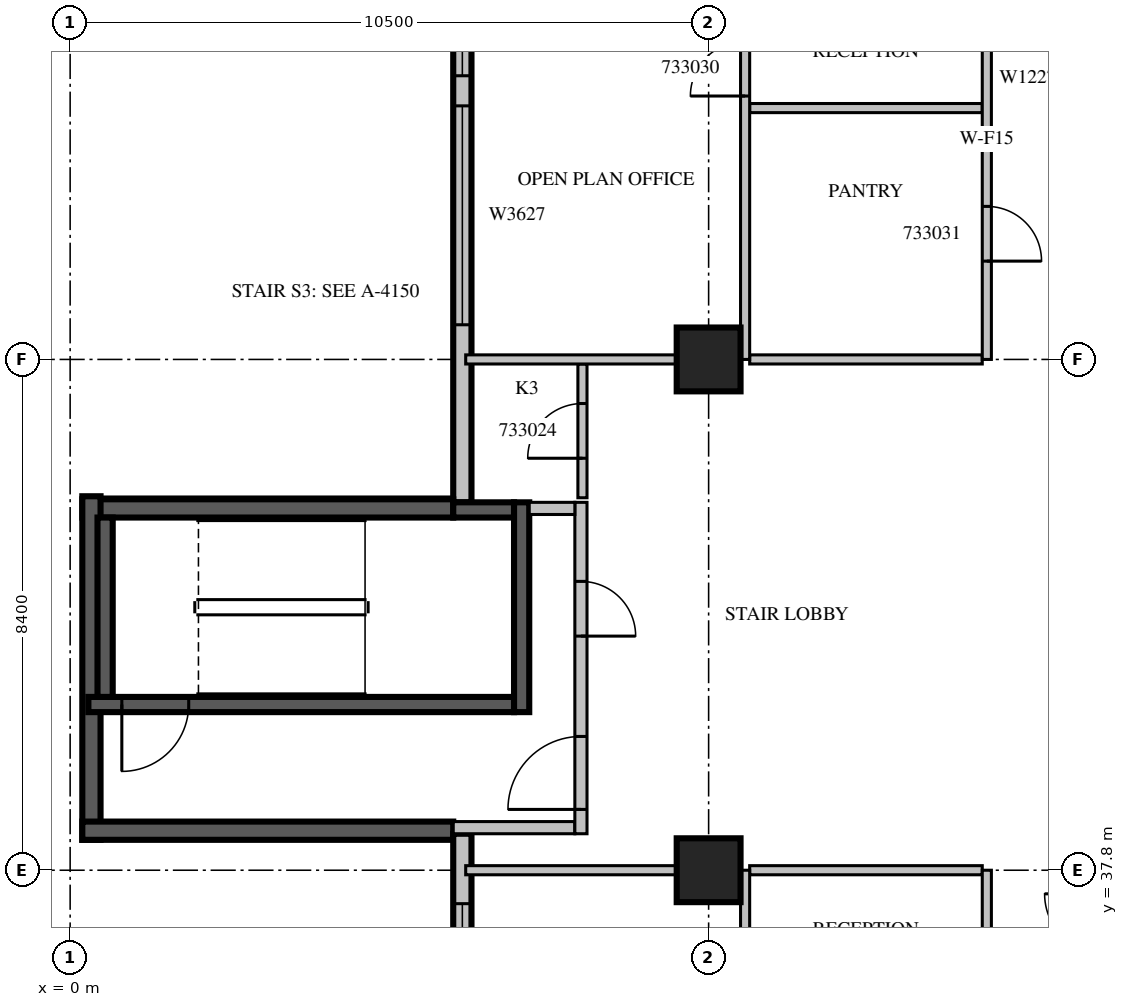
"""IFC4 building model, lengths in metres.
Left out: names, types, materials, properties, quantities, classifications, styles, units other than length and angle.
Written with IfcOpenShell. Run it as: python <this file> out.ifc"""

import sys

from ifc_helpers import new_model, si_unit, direction, frame, frame_2d, origin, origin_2d, place, context, subcontext, project, spatial, rectangle, extrude, source, transform, mapped, element, fill, save


model = new_model("IFC4")
c1 = context("Model", 3, precision=1e-05, world=origin(), true_north=direction((0.0, 1.0)))
c2 = subcontext(c1, "Body", "Model", "MODEL_VIEW")
j1 = project(units=[si_unit("LENGTHUNIT", "METRE"), si_unit("PLANEANGLEUNIT", "RADIAN")], contexts=[c1])
p1 = place(None, origin())
s1 = spatial("IfcSite", under=j1, at=p1, CompositionType="ELEMENT")
p2 = place(p1, origin())
s2 = spatial("IfcBuilding", under=s1, at=p2, CompositionType="ELEMENT")
p3 = place(p2, frame((0.0, 0.0, 149.7)))
s3 = spatial("IfcBuildingStorey", under=s2, at=p3, CompositionType="ELEMENT", Elevation=149.7)
m1 = source(origin(), c2, "Body", "SweptSolid", [
    extrude(rectangle(XDim=1.05, YDim=1.05, at=origin_2d()), origin(), (0.0, 0.0, 1.0), 4.2),
])
for number, where, z_axis, x_axis in (
    (1, (10.5, 37.8, 0.0), (0.0, 0.0, 1.0), (1.0, 0.0, 0.0)),
    (2, (10.5, 46.2, 0.0), (0.0, 0.0, 1.0), (1.0, 0.0, 0.0)),
):
    element("IfcColumn", number, at=place(p3, frame(where, z_axis=z_axis, x_axis=x_axis)), inside=s3, PredefinedType="COLUMN", context=c2, shape_type="MappedRepresentation", body=[
        mapped(m1, transform((0.0, 0.0, 0.0), scale=1.0)),
    ])
m2 = source(origin(), c2, "Body", "SweptSolid", [
    extrude(rectangle(XDim=9.91, YDim=0.3, at=frame_2d((4.955, 0.0))), origin(), (0.0, 0.0, 1.0), 3.8),
])
p4 = place(p3, frame((6.45, 53.76, 0.0), z_axis=(0.0, 0.0, 1.0), x_axis=(0.0, -1.0, 0.0)))
e3 = element("IfcWall", 3, at=p4, inside=s3, PredefinedType="STANDARD", context=c2, shape_type="MappedRepresentation", body=[
    mapped(m2, transform((0.0, 0.0, 0.0), scale=1.0)),
])
m3 = source(origin(), c2, "Body", "SweptSolid", [
    extrude(rectangle(XDim=3.6, YDim=2.7, at=frame_2d((1.8, 1.35))), frame((0.0, 0.16, 0.0), z_axis=(0.0, -1.0, 0.0), x_axis=(1.0, 0.0, 0.0)), (0.0, 0.0, 1.0), 0.32),
])
p5 = place(p4, frame((3.39, 0.0, 0.6)))
e4 = element("IfcOpeningElement", 4, at=p5, cuts=e3, PredefinedType="OPENING", context=c2, shape_type="MappedRepresentation", body=[
    mapped(m3, transform((0.0, 0.0, 0.0), scale=1.0)),
])
m4 = source(origin(), c2, "Body", "SweptSolid", [
    extrude(rectangle(XDim=2.4, YDim=2.7, at=frame_2d((1.2, 1.35))), frame((0.0, 0.16, 0.0), z_axis=(0.0, -1.0, 0.0), x_axis=(1.0, 0.0, 0.0)), (0.0, 0.0, 1.0), 0.32),
])
p6 = place(p4, frame((0.495, 0.0, 0.6)))
e5 = element("IfcOpeningElement", 5, at=p6, cuts=e3, PredefinedType="OPENING", context=c2, shape_type="MappedRepresentation", body=[
    mapped(m4, transform((0.0, 0.0, 0.0), scale=1.0)),
])
m5 = source(origin(), c2, "Body", "SweptSolid", [
    extrude(rectangle(XDim=6.1, YDim=0.3, at=frame_2d((3.05, 0.0))), origin(), (0.0, 0.0, 1.0), 3.8),
])
p7 = place(p3, frame((6.3, 43.75, 0.0), z_axis=(0.0, 0.0, 1.0), x_axis=(-1.0, 0.0, 0.0)))
e6 = element("IfcWall", 6, at=p7, inside=s3, PredefinedType="SOLIDWALL", context=c2, shape_type="MappedRepresentation", body=[
    mapped(m5, transform((0.0, 0.0, 0.0), scale=1.0)),
])
m6 = source(origin(), c2, "Body", "SweptSolid", [
    extrude(rectangle(XDim=5.65, YDim=0.3, at=frame_2d((2.825, 0.0))), origin(), (0.0, 0.0, 1.0), 3.8),
])
p8 = place(p3, frame((0.35, 43.95, 0.0), z_axis=(0.0, 0.0, 1.0), x_axis=(0.0, -1.0, 0.0)))
e7 = element("IfcWall", 7, at=p8, inside=s3, PredefinedType="SOLIDWALL", context=c2, shape_type="MappedRepresentation", body=[
    mapped(m6, transform((0.0, 0.0, 0.0), scale=1.0)),
])
p9 = place(p3, frame((0.2, 38.45, 0.0), z_axis=(0.0, 0.0, 1.0), x_axis=(1.0, 0.0, 0.0)))
e8 = element("IfcWall", 8, at=p9, inside=s3, PredefinedType="SOLIDWALL", context=c2, shape_type="MappedRepresentation", body=[
    mapped(m5, transform((0.0, 0.0, 0.0), scale=1.0)),
])
m7 = source(origin(), c2, "Body", "SweptSolid", [
    extrude(rectangle(XDim=16.4, YDim=0.3, at=frame_2d((8.2, 0.0))), origin(), (0.0, 0.0, 1.0), 3.8),
])
p10 = place(p3, frame((6.45, 38.4, 0.0), z_axis=(0.0, 0.0, 1.0), x_axis=(0.0, -1.0, 0.0)))
e9 = element("IfcWall", 9, at=p10, inside=s3, PredefinedType="STANDARD", context=c2, shape_type="MappedRepresentation", body=[
    mapped(m7, transform((0.0, 0.0, 0.0), scale=1.0)),
])
m8 = source(origin(), c2, "Body", "SweptSolid", [
    extrude(rectangle(XDim=1.8, YDim=2.7, at=frame_2d((0.9, 1.35))), frame((0.0, 0.16, 0.0), z_axis=(0.0, -1.0, 0.0), x_axis=(1.0, 0.0, 0.0)), (0.0, 0.0, 1.0), 0.32),
])
p11 = place(p10, frame((1.15, 0.0, 0.6)))
e10 = element("IfcOpeningElement", 10, at=p11, cuts=e9, PredefinedType="OPENING", context=c2, shape_type="MappedRepresentation", body=[
    mapped(m8, transform((0.0, 0.0, 0.0), scale=1.0)),
])
p12 = place(p10, frame((4.75, 0.0, 0.6)))
e11 = element("IfcOpeningElement", 11, at=p12, cuts=e9, PredefinedType="OPENING", context=c2, shape_type="MappedRepresentation", body=[
    mapped(m4, transform((0.0, 0.0, 0.0), scale=1.0)),
])
m9 = source(origin(), c2, "Body", "SweptSolid", [
    extrude(rectangle(XDim=1.2, YDim=2.7, at=frame_2d((0.6, 1.35))), frame((0.0, 0.16, 0.0), z_axis=(0.0, -1.0, 0.0), x_axis=(1.0, 0.0, 0.0)), (0.0, 0.0, 1.0), 0.32),
])
p13 = place(p10, frame((12.912, 0.0, 0.6)))
e12 = element("IfcOpeningElement", 12, at=p13, cuts=e9, PredefinedType="OPENING", context=c2, shape_type="MappedRepresentation", body=[
    mapped(m9, transform((0.0, 0.0, 0.0), scale=1.0)),
])
m10 = source(origin(), c2, "Body", "SweptSolid", [
    extrude(rectangle(XDim=1.0, YDim=2.1, at=frame_2d((0.5, 1.05))), frame((0.0, 0.16, 0.0), z_axis=(0.0, -1.0, 0.0), x_axis=(1.0, 0.0, 0.0)), (0.0, 0.0, 1.0), 0.32),
])
p14 = place(p10, frame((10.142, 0.0, 0.0)))
e13 = element("IfcOpeningElement", 13, at=p14, cuts=e9, PredefinedType="OPENING", context=c2, shape_type="MappedRepresentation", body=[
    mapped(m10, transform((0.0, 0.0, 0.0), scale=1.0)),
])
m11 = source(origin(), c2, "Body", "SweptSolid", [
    extrude(rectangle(XDim=7.0, YDim=0.25, at=frame_2d((3.5, 0.0))), origin(), (0.0, 0.0, 1.0), 3.8),
])
p15 = place(p3, frame((0.3, 40.525, 0.0), z_axis=(0.0, 0.0, 1.0), x_axis=(1.0, 0.0, 0.0)))
e14 = element("IfcWall", 14, at=p15, inside=s3, PredefinedType="SOLIDWALL", context=c2, shape_type="MappedRepresentation", body=[
    mapped(m11, transform((0.0, 0.0, 0.0), scale=1.0)),
])
m12 = source(origin(), c2, "Body", "SweptSolid", [
    extrude(rectangle(XDim=1.1, YDim=2.1, at=frame_2d((0.55, 1.05))), frame((0.0, 0.135, 0.0), z_axis=(0.0, -1.0, 0.0), x_axis=(1.0, 0.0, 0.0)), (0.0, 0.0, 1.0), 0.27),
])
p16 = place(p15, frame((0.55, 0.0, 0.0)))
e15 = element("IfcOpeningElement", 15, at=p16, cuts=e14, PredefinedType="OPENING", context=c2, shape_type="MappedRepresentation", body=[
    mapped(m12, transform((0.0, 0.0, 0.0), scale=1.0)),
])
m13 = source(origin(), c2, "Body", "SweptSolid", [
    extrude(rectangle(XDim=1.0, YDim=0.25, at=frame_2d((0.5, 0.0))), origin(), (0.0, 0.0, 1.0), 3.8),
])
p17 = place(p3, frame((6.3, 43.725, 0.0), z_axis=(0.0, 0.0, 1.0), x_axis=(1.0, 0.0, 0.0)))
e16 = element("IfcWall", 16, at=p17, inside=s3, PredefinedType="SOLIDWALL", context=c2, shape_type="MappedRepresentation", body=[
    mapped(m13, transform((0.0, 0.0, 0.0), scale=1.0)),
])
m14 = source(origin(), c2, "Body", "SweptSolid", [
    extrude(rectangle(XDim=3.45, YDim=0.25, at=frame_2d((1.725, 0.0))), origin(), (0.0, 0.0, 1.0), 3.8),
])
p18 = place(p3, frame((7.425, 40.4, 0.0), z_axis=(0.0, 0.0, 1.0), x_axis=(0.0, 1.0, 0.0)))
e17 = element("IfcWall", 17, at=p18, inside=s3, PredefinedType="SOLIDWALL", context=c2, shape_type="MappedRepresentation", body=[
    mapped(m14, transform((0.0, 0.0, 0.0), scale=1.0)),
])
m15 = source(origin(), c2, "Body", "SweptSolid", [
    extrude(rectangle(XDim=2.95, YDim=0.25, at=frame_2d((1.475, 0.0))), origin(), (0.0, 0.0, 1.0), 3.8),
])
p19 = place(p3, frame((0.575, 40.65, 0.0), z_axis=(0.0, 0.0, 1.0), x_axis=(0.0, 1.0, 0.0)))
e18 = element("IfcWall", 18, at=p19, inside=s3, PredefinedType="SOLIDWALL", context=c2, shape_type="MappedRepresentation", body=[
    mapped(m15, transform((0.0, 0.0, 0.0), scale=1.0)),
])
m16 = source(origin(), c2, "Body", "SweptSolid", [
    extrude(rectangle(XDim=2.0, YDim=0.2, at=frame_2d((1.0, 0.0))), origin(), (0.0, 0.0, 1.0), 3.8),
])
p20 = place(p3, frame((6.3, 38.5, 0.0), z_axis=(0.0, 0.0, 1.0), x_axis=(1.0, 0.0, 0.0)))
e19 = element("IfcWall", 19, at=p20, inside=s3, PredefinedType="PARTITIONING", context=c2, shape_type="MappedRepresentation", body=[
    mapped(m16, transform((0.0, 0.0, 0.0), scale=1.0)),
])
m17 = source(origin(), c2, "Body", "SweptSolid", [
    extrude(rectangle(XDim=5.45, YDim=0.2, at=frame_2d((2.725, 0.0))), origin(), (0.0, 0.0, 1.0), 3.8),
])
p21 = place(p3, frame((8.4, 38.4, 0.0), z_axis=(0.0, 0.0, 1.0), x_axis=(0.0, 1.0, 0.0)))
e20 = element("IfcWall", 20, at=p21, inside=s3, PredefinedType="PARTITIONING", context=c2, shape_type="MappedRepresentation", body=[
    mapped(m17, transform((0.0, 0.0, 0.0), scale=1.0)),
])
m18 = source(origin(), c2, "Body", "SweptSolid", [
    extrude(rectangle(XDim=1.2, YDim=2.1, at=frame_2d((0.6, 1.05))), frame((0.0, 0.11, 0.0), z_axis=(0.0, -1.0, 0.0), x_axis=(1.0, 0.0, 0.0)), (0.0, 0.0, 1.0), 0.22),
])
p22 = place(p21, frame((0.4, 0.0, 0.0)))
e21 = element("IfcOpeningElement", 21, at=p22, cuts=e20, PredefinedType="OPENING", context=c2, shape_type="MappedRepresentation", body=[
    mapped(m18, transform((0.0, 0.0, 0.0), scale=1.0)),
])
m19 = source(origin(), c2, "Body", "SweptSolid", [
    extrude(rectangle(XDim=0.9, YDim=2.1, at=frame_2d((0.45, 1.05))), frame((0.0, 0.11, 0.0), z_axis=(0.0, -1.0, 0.0), x_axis=(1.0, 0.0, 0.0)), (0.0, 0.0, 1.0), 0.22),
])
p23 = place(p21, frame((3.25, 0.0, 0.0)))
e22 = element("IfcOpeningElement", 22, at=p23, cuts=e20, PredefinedType="OPENING", context=c2, shape_type="MappedRepresentation", body=[
    mapped(m19, transform((0.0, 0.0, 0.0), scale=1.0)),
])
m20 = source(origin(), c2, "Body", "SweptSolid", [
    extrude(rectangle(XDim=0.75, YDim=0.2, at=frame_2d((0.375, 0.0))), origin(), (0.0, 0.0, 1.0), 3.8),
])
p24 = place(p3, frame((7.55, 43.75, 0.0), z_axis=(0.0, 0.0, 1.0), x_axis=(1.0, 0.0, 0.0)))
e23 = element("IfcWall", 23, at=p24, inside=s3, PredefinedType="PARTITIONING", context=c2, shape_type="MappedRepresentation", body=[
    mapped(m20, transform((0.0, 0.0, 0.0), scale=1.0)),
])
m21 = source(origin(), c2, "Body", "SweptSolid", [
    extrude(rectangle(XDim=2.2, YDim=0.15, at=frame_2d((1.1, 0.0))), origin(), (0.0, 0.0, 1.0), 3.8),
])
p25 = place(p3, frame((8.425, 43.925, 0.0), z_axis=(0.0, 0.0, 1.0), x_axis=(0.0, 1.0, 0.0)))
e24 = element("IfcWall", 24, at=p25, inside=s3, PredefinedType="PARTITIONING", context=c2, shape_type="MappedRepresentation", body=[
    mapped(m21, transform((0.0, 0.0, 0.0), scale=1.0)),
])
m22 = source(origin(), c2, "Body", "SweptSolid", [
    extrude(rectangle(XDim=0.9, YDim=2.1, at=frame_2d((0.45, 1.05))), frame((0.0, 0.085, 0.0), z_axis=(0.0, -1.0, 0.0), x_axis=(1.0, 0.0, 0.0)), (0.0, 0.0, 1.0), 0.17),
])
p26 = place(p25, frame((0.65, 0.0, 0.0)))
e25 = element("IfcOpeningElement", 25, at=p26, cuts=e24, PredefinedType="OPENING", context=c2, shape_type="MappedRepresentation", body=[
    mapped(m22, transform((0.0, 0.0, 0.0), scale=1.0)),
])
m23 = source(origin(), c2, "Body", "SweptSolid", [
    extrude(rectangle(XDim=3.471, YDim=0.15, at=frame_2d((1.736, 0.0))), origin(), (0.0, 0.0, 1.0), 3.8),
])
p27 = place(p3, frame((9.976, 37.8, 0.0), z_axis=(0.0, 0.0, 1.0), x_axis=(-1.0, 0.0, 0.0)))
e26 = element("IfcWall", 26, at=p27, inside=s3, PredefinedType="PARTITIONING", context=c2, shape_type="MappedRepresentation", body=[
    mapped(m23, transform((0.0, 0.0, 0.0), scale=1.0)),
])
m24 = source(origin(), c2, "Body", "SweptSolid", [
    extrude(rectangle(XDim=3.825, YDim=0.15, at=frame_2d((1.913, 0.0))), origin(), (0.0, 0.0, 1.0), 3.8),
])
p28 = place(p3, frame((15.0, 37.8, 0.0), z_axis=(0.0, 0.0, 1.0), x_axis=(-1.0, 0.0, 0.0)))
e27 = element("IfcWall", 27, at=p28, inside=s3, PredefinedType="PARTITIONING", context=c2, shape_type="MappedRepresentation", body=[
    mapped(m24, transform((0.0, 0.0, 0.0), scale=1.0)),
])
m25 = source(origin(), c2, "Body", "SweptSolid", [
    extrude(rectangle(XDim=8.4, YDim=0.15, at=frame_2d((4.2, 0.0))), origin(), (0.0, 0.0, 1.0), 3.8),
])
p29 = place(p3, frame((11.1, 29.4, 0.0), z_axis=(0.0, 0.0, 1.0), x_axis=(0.0, 1.0, 0.0)))
e28 = element("IfcWall", 28, at=p29, inside=s3, PredefinedType="PARTITIONING", context=c2, shape_type="MappedRepresentation", body=[
    mapped(m25, transform((0.0, 0.0, 0.0), scale=1.0)),
])
m26 = source(origin(), c2, "Body", "SweptSolid", [
    extrude(rectangle(XDim=1.1, YDim=2.1, at=frame_2d((0.55, 1.05))), frame((0.0, 0.085, 0.0), z_axis=(0.0, -1.0, 0.0), x_axis=(1.0, 0.0, 0.0)), (0.0, 0.0, 1.0), 0.17),
])
p30 = place(p29, frame((5.955, 0.0, 0.0)))
e29 = element("IfcOpeningElement", 29, at=p30, cuts=e28, PredefinedType="OPENING", context=c2, shape_type="MappedRepresentation", body=[
    mapped(m26, transform((0.0, 0.0, 0.0), scale=1.0)),
])
p31 = place(p3, frame((15.0, 50.334, 0.0), z_axis=(0.0, 0.0, 1.0), x_axis=(-1.0, 0.0, 0.0)))
e30 = element("IfcWall", 30, at=p31, inside=s3, PredefinedType="PARTITIONING", context=c2, shape_type="MappedRepresentation", body=[
    mapped(m24, transform((0.0, 0.0, 0.0), scale=1.0)),
])
p32 = place(p3, frame((9.976, 46.2, 0.0), z_axis=(0.0, 0.0, 1.0), x_axis=(-1.0, 0.0, 0.0)))
e31 = element("IfcWall", 31, at=p32, inside=s3, PredefinedType="PARTITIONING", context=c2, shape_type="MappedRepresentation", body=[
    mapped(m23, transform((0.0, 0.0, 0.0), scale=1.0)),
])
p33 = place(p3, frame((15.0, 46.2, 0.0), z_axis=(0.0, 0.0, 1.0), x_axis=(-1.0, 0.0, 0.0)))
e32 = element("IfcWall", 32, at=p33, inside=s3, PredefinedType="PARTITIONING", context=c2, shape_type="MappedRepresentation", body=[
    mapped(m24, transform((0.0, 0.0, 0.0), scale=1.0)),
])
m27 = source(origin(), c2, "Body", "SweptSolid", [
    extrude(rectangle(XDim=7.26, YDim=0.15, at=frame_2d((3.63, 0.0))), origin(), (0.0, 0.0, 1.0), 3.8),
])
p34 = place(p3, frame((11.1, 46.2, 0.0), z_axis=(0.0, 0.0, 1.0), x_axis=(0.0, 1.0, 0.0)))
e33 = element("IfcWall", 33, at=p34, inside=s3, PredefinedType="PARTITIONING", context=c2, shape_type="MappedRepresentation", body=[
    mapped(m27, transform((0.0, 0.0, 0.0), scale=1.0)),
])
p35 = place(p34, frame((4.332, 0.0, 0.0)))
e34 = element("IfcOpeningElement", 34, at=p35, cuts=e33, PredefinedType="OPENING", context=c2, shape_type="MappedRepresentation", body=[
    mapped(m22, transform((0.0, 0.0, 0.0), scale=1.0)),
])
p36 = place(p3, frame((15.075, 29.4, 0.0), z_axis=(0.0, 0.0, 1.0), x_axis=(0.0, 1.0, 0.0)))
e35 = element("IfcWall", 35, at=p36, inside=s3, PredefinedType="PARTITIONING", context=c2, shape_type="MappedRepresentation", body=[
    mapped(m25, transform((0.0, 0.0, 0.0), scale=1.0)),
])
p37 = place(p36, frame((6.18, 0.0, 0.0)))
e36 = element("IfcOpeningElement", 36, at=p37, cuts=e35, PredefinedType="OPENING", context=c2, shape_type="MappedRepresentation", body=[
    mapped(m26, transform((0.0, 0.0, 0.0), scale=1.0)),
])
p38 = place(p36, frame((0.756, 0.0, 0.0)))
e37 = element("IfcOpeningElement", 37, at=p38, cuts=e35, PredefinedType="OPENING", context=c2, shape_type="MappedRepresentation", body=[
    mapped(m22, transform((0.0, 0.0, 0.0), scale=1.0)),
])
p39 = place(p36, frame((3.286, 0.0, 0.0)))
e38 = element("IfcOpeningElement", 38, at=p39, cuts=e35, PredefinedType="OPENING", context=c2, shape_type="MappedRepresentation", body=[
    mapped(m22, transform((0.0, 0.0, 0.0), scale=1.0)),
])
p40 = place(p3, frame((15.075, 46.2, 0.0), z_axis=(0.0, 0.0, 1.0), x_axis=(0.0, 1.0, 0.0)))
e39 = element("IfcWall", 39, at=p40, inside=s3, PredefinedType="PARTITIONING", context=c2, shape_type="MappedRepresentation", body=[
    mapped(m27, transform((0.0, 0.0, 0.0), scale=1.0)),
])
p41 = place(p40, frame((5.184, 0.0, 0.0)))
e40 = element("IfcOpeningElement", 40, at=p41, cuts=e39, PredefinedType="OPENING", context=c2, shape_type="MappedRepresentation", body=[
    mapped(m26, transform((0.0, 0.0, 0.0), scale=1.0)),
])
p42 = place(p40, frame((1.617, 0.0, 0.0)))
e41 = element("IfcOpeningElement", 41, at=p42, cuts=e39, PredefinedType="OPENING", context=c2, shape_type="MappedRepresentation", body=[
    mapped(m22, transform((0.0, 0.0, 0.0), scale=1.0)),
])
m28 = source(origin(), c2, "Body", "SweptSolid", [
    extrude(rectangle(XDim=3.6, YDim=2.7, at=frame_2d((1.8, 1.35))), frame((0.0, 0.03, 0.0), z_axis=(0.0, -1.0, 0.0), x_axis=(1.0, 0.0, 0.0)), (0.0, 0.0, 1.0), 0.06),
])
p43 = place(p5, origin())
e42 = element("IfcWindow", 42, at=p43, inside=s3, PartitioningType="SINGLE_PANEL", PredefinedType="WINDOW", context=c2, shape_type="MappedRepresentation", body=[
    mapped(m28, transform((0.0, 0.0, 0.0), scale=1.0)),
])
fill(e4, e42)
m29 = source(origin(), c2, "Body", "SweptSolid", [
    extrude(rectangle(XDim=2.4, YDim=2.7, at=frame_2d((1.2, 1.35))), frame((0.0, 0.03, 0.0), z_axis=(0.0, -1.0, 0.0), x_axis=(1.0, 0.0, 0.0)), (0.0, 0.0, 1.0), 0.06),
])
p44 = place(p6, origin())
e43 = element("IfcWindow", 43, at=p44, inside=s3, PartitioningType="SINGLE_PANEL", PredefinedType="WINDOW", context=c2, shape_type="MappedRepresentation", body=[
    mapped(m29, transform((0.0, 0.0, 0.0), scale=1.0)),
])
fill(e5, e43)
m30 = source(origin(), c2, "Body", "SweptSolid", [
    extrude(rectangle(XDim=1.8, YDim=2.7, at=frame_2d((0.9, 1.35))), frame((0.0, 0.03, 0.0), z_axis=(0.0, -1.0, 0.0), x_axis=(1.0, 0.0, 0.0)), (0.0, 0.0, 1.0), 0.06),
])
p45 = place(p11, origin())
e44 = element("IfcWindow", 44, at=p45, inside=s3, PartitioningType="SINGLE_PANEL", PredefinedType="WINDOW", context=c2, shape_type="MappedRepresentation", body=[
    mapped(m30, transform((0.0, 0.0, 0.0), scale=1.0)),
])
fill(e10, e44)
m31 = source(origin(), c2, "Body", "SweptSolid", [
    extrude(rectangle(XDim=1.1, YDim=2.1, at=frame_2d((0.55, 1.05))), frame((0.0, 0.025, 0.0), z_axis=(0.0, -1.0, 0.0), x_axis=(1.0, 0.0, 0.0)), (0.0, 0.0, 1.0), 0.05),
])
p46 = place(p16, origin())
e45 = element("IfcDoor", 45, at=p46, inside=s3, OperationType="SINGLE_SWING_RIGHT", PredefinedType="DOOR", context=c2, shape_type="MappedRepresentation", body=[
    mapped(m31, transform((0.0, 0.0, 0.0), scale=1.0)),
])
fill(e15, e45)
m32 = source(origin(), c2, "Body", "SweptSolid", [
    extrude(rectangle(XDim=1.2, YDim=2.1, at=frame_2d((0.6, 1.05))), frame((0.0, 0.025, 0.0), z_axis=(0.0, -1.0, 0.0), x_axis=(1.0, 0.0, 0.0)), (0.0, 0.0, 1.0), 0.05),
])
p47 = place(p22, origin())
e46 = element("IfcDoor", 46, at=p47, inside=s3, OperationType="SINGLE_SWING_LEFT", PredefinedType="DOOR", context=c2, shape_type="MappedRepresentation", body=[
    mapped(m32, transform((0.0, 0.0, 0.0), scale=1.0)),
])
fill(e21, e46)
m33 = source(origin(), c2, "Body", "SweptSolid", [
    extrude(rectangle(XDim=0.9, YDim=2.1, at=frame_2d((0.45, 1.05))), frame((0.0, 0.025, 0.0), z_axis=(0.0, -1.0, 0.0), x_axis=(1.0, 0.0, 0.0)), (0.0, 0.0, 1.0), 0.05),
])
p48 = place(p23, origin())
e47 = element("IfcDoor", 47, at=p48, inside=s3, OperationType="SINGLE_SWING_RIGHT", PredefinedType="DOOR", context=c2, shape_type="MappedRepresentation", body=[
    mapped(m33, transform((0.0, 0.0, 0.0), scale=1.0)),
])
fill(e22, e47)
p49 = place(p26, origin())
e48 = element("IfcDoor", 48, at=p49, inside=s3, OperationType="SINGLE_SWING_LEFT", PredefinedType="DOOR", context=c2, shape_type="MappedRepresentation", body=[
    mapped(m33, transform((0.0, 0.0, 0.0), scale=1.0)),
])
fill(e25, e48)
p50 = place(p35, origin())
e49 = element("IfcDoor", 49, at=p50, inside=s3, OperationType="SINGLE_SWING_LEFT", PredefinedType="DOOR", context=c2, shape_type="MappedRepresentation", body=[
    mapped(m33, transform((0.0, 0.0, 0.0), scale=1.0)),
])
fill(e34, e49)
p51 = place(p42, origin())
e50 = element("IfcDoor", 50, at=p51, inside=s3, OperationType="SINGLE_SWING_RIGHT", PredefinedType="DOOR", context=c2, shape_type="MappedRepresentation", body=[
    mapped(m33, transform((0.0, 0.0, 0.0), scale=1.0)),
])
fill(e41, e50)
save(model, sys.argv[1])
